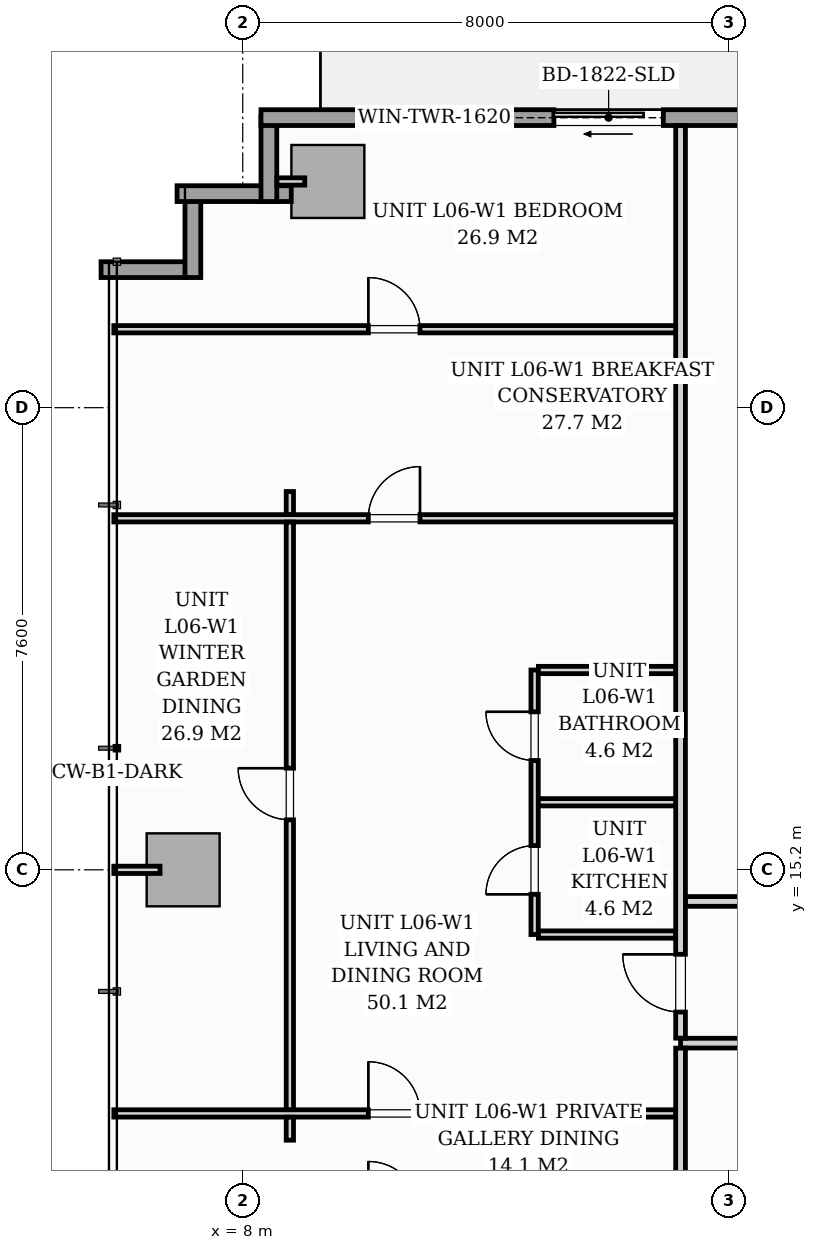
"""IFC4 building model, lengths in metres.
Left out: names, types, materials, properties, quantities, classifications, styles, units other than length and angle.
Written with IfcOpenShell. Run it as: python <this file> out.ifc"""

import sys

from ifc_helpers import new_model, si_unit, direction, frame, frame_2d, origin, origin_2d, place, context, subcontext, project, spatial, rectangle, extrude, source, transform, mapped, element, fill, save


model = new_model("IFC4")
c1 = context("Model", 3, precision=1e-05, world=origin(), true_north=direction((0.0, 1.0)))
c2 = subcontext(c1, "Body", "Model", "MODEL_VIEW")
j1 = project(units=[si_unit("LENGTHUNIT", "METRE"), si_unit("PLANEANGLEUNIT", "RADIAN")], contexts=[c1])
p1 = place(None, origin())
s1 = spatial("IfcSite", under=j1, at=p1, CompositionType="ELEMENT")
p2 = place(p1, origin())
s2 = spatial("IfcBuilding", under=s1, at=p2, CompositionType="ELEMENT")
p3 = place(p2, frame((0.0, 0.0, 26.2)))
s3 = spatial("IfcBuildingStorey", under=s2, at=p3, CompositionType="ELEMENT", Elevation=26.2)
m1 = source(origin(), c2, "Body", "SweptSolid", [
    extrude(rectangle(XDim=1.2, YDim=1.2, at=origin_2d()), origin(), (0.0, 0.0, 1.0), 3.196),
])
for number, where, z_axis, x_axis in (
    (1, (9.4, 26.52, 0.002), (0.0, 0.0, 1.0), (1.0, 0.0, 0.0)),
    (2, (7.02, 15.2, 0.002), (0.0, 0.0, 1.0), (1.0, 0.0, 0.0)),
):
    element("IfcColumn", number, at=place(p3, frame(where, z_axis=z_axis, x_axis=x_axis)), inside=s3, PredefinedType="COLUMN", context=c2, shape_type="MappedRepresentation", body=[
        mapped(m1, transform((0.0, 0.0, 0.0), scale=1.0)),
    ])
for number, where, z_axis, x_axis in (
    (3, (5.67, 25.07, 0.0), (0.0, 0.0, 1.0), (1.0, 0.0, 0.0)),
    (4, (7.18, 24.94, 0.0), (0.0, 0.0, 1.0), (0.0, 1.0, 0.0)),
):
    element("IfcWall", number, at=place(p3, frame(where, z_axis=z_axis, x_axis=x_axis)), inside=s3, PredefinedType="STANDARD", context=c2, shape_type="SweptSolid", body=[
        extrude(rectangle(XDim=1.395, YDim=0.26, at=frame_2d((0.698, 0.0))), origin(), (0.0, 0.0, 1.0), 2.94),
    ])
p4 = place(p3, frame((6.92, 26.32, 0.0), z_axis=(0.0, 0.0, 1.0), x_axis=(1.0, 0.0, 0.0)))
e5 = element("IfcWall", 5, at=p4, inside=s3, PredefinedType="STANDARD", context=c2, shape_type="SweptSolid", body=[
    extrude(rectangle(XDim=1.878, YDim=0.26, at=frame_2d((0.939, 0.0))), origin(), (0.0, 0.0, 1.0), 2.94),
])
p5 = place(p3, frame((8.43, 26.19, 0.0), z_axis=(0.0, 0.0, 1.0), x_axis=(0.0, 1.0, 0.0)))
e6 = element("IfcWall", 6, at=p5, inside=s3, PredefinedType="STANDARD", context=c2, shape_type="SweptSolid", body=[
    extrude(rectangle(XDim=1.395, YDim=0.26, at=frame_2d((0.698, 0.0))), origin(), (0.0, 0.0, 1.0), 2.94),
])
p6 = place(p3, frame((8.3, 27.57, 0.0), z_axis=(0.0, 0.0, 1.0), x_axis=(1.0, 0.0, 0.0)))
e7 = element("IfcWall", 7, at=p6, inside=s3, PredefinedType="STANDARD", context=c2, shape_type="SweptSolid", body=[
    extrude(rectangle(XDim=17.15, YDim=0.26, at=frame_2d((8.575, 0.0))), origin(), (0.0, 0.0, 1.0), 2.94),
])
p7 = place(p6, frame((4.817, 0.0, 0.0)))
e8 = element("IfcOpeningElement", 8, at=p7, cuts=e7, PredefinedType="OPENING", context=c2, shape_type="SweptSolid", body=[
    extrude(rectangle(XDim=1.8, YDim=2.06, at=frame_2d((0.9, 1.03))), frame((0.0, 0.14, 0.0), z_axis=(0.0, -1.0, 0.0), x_axis=(1.0, 0.0, 0.0)), (0.0, 0.0, 1.0), 0.28),
])
p8 = place(p6, frame((2.05, 0.0, 0.65)))
e9 = element("IfcOpeningElement", 9, at=p8, cuts=e7, PredefinedType="OPENING", context=c2, shape_type="SweptSolid", body=[
    extrude(rectangle(XDim=1.6, YDim=1.5, at=frame_2d((0.8, 0.75))), frame((0.0, 0.14, 0.0), z_axis=(0.0, -1.0, 0.0), x_axis=(1.0, 0.0, 0.0)), (0.0, 0.0, 1.0), 0.28),
])
p9 = place(p3, frame((15.2, 12.35, 0.0), z_axis=(0.0, 0.0, 1.0), x_axis=(1.0, 0.0, 0.0)))
e10 = element("IfcWall", 10, at=p9, inside=s3, PredefinedType="PARTITIONING", context=c2, shape_type="SweptSolid", body=[
    extrude(rectangle(XDim=37.1, YDim=0.16, at=frame_2d((18.55, 0.0))), origin(), (0.0, 0.0, 1.0), 2.94),
])
p10 = place(p9, frame((2.964, 0.0, 0.0)))
e11 = element("IfcOpeningElement", 11, at=p10, cuts=e10, PredefinedType="OPENING", context=c2, shape_type="SweptSolid", body=[
    extrude(rectangle(XDim=0.95, YDim=2.06, at=frame_2d((0.475, 1.03))), frame((0.0, 0.09, 0.0), z_axis=(0.0, -1.0, 0.0), x_axis=(1.0, 0.0, 0.0)), (0.0, 0.0, 1.0), 0.18),
])
p11 = place(p9, frame((28.202, 0.0, 0.0)))
e12 = element("IfcOpeningElement", 12, at=p11, cuts=e10, PredefinedType="OPENING", context=c2, shape_type="SweptSolid", body=[
    extrude(rectangle(XDim=0.95, YDim=2.06, at=frame_2d((0.475, 1.03))), frame((0.0, 0.09, 0.0), z_axis=(0.0, -1.0, 0.0), x_axis=(1.0, 0.0, 0.0)), (0.0, 0.0, 1.0), 0.18),
])
p12 = place(p3, frame((15.2, 2.962, 0.0), z_axis=(0.0, 0.0, 1.0), x_axis=(0.0, 1.0, 0.0)))
e13 = element("IfcWall", 13, at=p12, inside=s3, PredefinedType="PARTITIONING", context=c2, shape_type="SweptSolid", body=[
    extrude(rectangle(XDim=9.306, YDim=0.16, at=frame_2d((4.653, 0.0))), origin(), (0.0, 0.0, 1.0), 2.94),
])
p13 = place(p3, frame((15.2, 12.432, 0.0), z_axis=(0.0, 0.0, 1.0), x_axis=(0.0, 1.0, 0.0)))
e14 = element("IfcWall", 14, at=p13, inside=s3, PredefinedType="PARTITIONING", context=c2, shape_type="SweptSolid", body=[
    extrude(rectangle(XDim=15.006, YDim=0.16, at=frame_2d((7.503, 0.0))), origin(), (0.0, 0.0, 1.0), 2.94),
])
p14 = place(p13, frame((0.429, 0.0, 0.0)))
e15 = element("IfcOpeningElement", 15, at=p14, cuts=e14, PredefinedType="OPENING", context=c2, shape_type="SweptSolid", body=[
    extrude(rectangle(XDim=0.95, YDim=2.06, at=frame_2d((0.475, 1.03))), frame((0.0, 0.09, 0.0), z_axis=(0.0, -1.0, 0.0), x_axis=(1.0, 0.0, 0.0)), (0.0, 0.0, 1.0), 0.18),
])
p15 = place(p3, frame((12.8, 14.136, 0.0), z_axis=(0.0, 0.0, 1.0), x_axis=(0.0, 1.0, 0.0)))
e16 = element("IfcWall", 16, at=p15, inside=s3, PredefinedType="PARTITIONING", context=c2, shape_type="SweptSolid", body=[
    extrude(rectangle(XDim=4.35, YDim=0.12, at=frame_2d((2.175, 0.0))), origin(), (0.0, 0.0, 1.0), 2.94),
])
p16 = place(p15, frame((0.662, 0.0, 0.0)))
e17 = element("IfcOpeningElement", 17, at=p16, cuts=e16, PredefinedType="OPENING", context=c2, shape_type="SweptSolid", body=[
    extrude(rectangle(XDim=0.8, YDim=2.0, at=frame_2d((0.4, 1.0))), frame((0.0, 0.07, 0.0), z_axis=(0.0, -1.0, 0.0), x_axis=(1.0, 0.0, 0.0)), (0.0, 0.0, 1.0), 0.14),
])
p17 = place(p15, frame((2.862, 0.0, 0.0)))
e18 = element("IfcOpeningElement", 18, at=p17, cuts=e16, PredefinedType="OPENING", context=c2, shape_type="SweptSolid", body=[
    extrude(rectangle(XDim=0.8, YDim=2.02, at=frame_2d((0.4, 1.01))), frame((0.0, 0.07, 0.0), z_axis=(0.0, -1.0, 0.0), x_axis=(1.0, 0.0, 0.0)), (0.0, 0.0, 1.0), 0.14),
])
p18 = place(p3, frame((12.862, 16.311, 0.0), z_axis=(0.0, 0.0, 1.0), x_axis=(1.0, 0.0, 0.0)))
e19 = element("IfcWall", 19, at=p18, inside=s3, PredefinedType="PARTITIONING", context=c2, shape_type="SweptSolid", body=[
    extrude(rectangle(XDim=2.256, YDim=0.12, at=frame_2d((1.128, 0.0))), origin(), (0.0, 0.0, 1.0), 2.045),
])
for number, where, z_axis, x_axis in (
    (20, (12.862, 14.136, 0.0), (0.0, 0.0, 1.0), (1.0, 0.0, 0.0)),
    (21, (12.862, 18.486, 0.0), (0.0, 0.0, 1.0), (1.0, 0.0, 0.0)),
):
    element("IfcWall", number, at=place(p3, frame(where, z_axis=z_axis, x_axis=x_axis)), inside=s3, PredefinedType="PARTITIONING", context=c2, shape_type="SweptSolid", body=[
        extrude(rectangle(XDim=2.256, YDim=0.12, at=frame_2d((1.128, 0.0))), origin(), (0.0, 0.0, 1.0), 2.94),
    ])
p19 = place(p3, frame((5.88, 24.09, 0.0), z_axis=(0.0, 0.0, 1.0), x_axis=(1.0, 0.0, 0.0)))
e22 = element("IfcWall", 22, at=p19, inside=s3, PredefinedType="PARTITIONING", context=c2, shape_type="SweptSolid", body=[
    extrude(rectangle(XDim=9.238, YDim=0.12, at=frame_2d((4.619, 0.0))), origin(), (0.0, 0.0, 1.0), 2.94),
])
p20 = place(p19, frame((4.185, 0.0, 0.0)))
e23 = element("IfcOpeningElement", 23, at=p20, cuts=e22, PredefinedType="OPENING", context=c2, shape_type="SweptSolid", body=[
    extrude(rectangle(XDim=0.85, YDim=2.05, at=frame_2d((0.425, 1.025))), frame((0.0, 0.07, 0.0), z_axis=(0.0, -1.0, 0.0), x_axis=(1.0, 0.0, 0.0)), (0.0, 0.0, 1.0), 0.14),
])
p21 = place(p3, frame((5.88, 20.981, 0.0), z_axis=(0.0, 0.0, 1.0), x_axis=(1.0, 0.0, 0.0)))
e24 = element("IfcWall", 24, at=p21, inside=s3, PredefinedType="PARTITIONING", context=c2, shape_type="SweptSolid", body=[
    extrude(rectangle(XDim=9.238, YDim=0.12, at=frame_2d((4.619, 0.0))), origin(), (0.0, 0.0, 1.0), 2.94),
])
p22 = place(p21, frame((4.185, 0.0, 0.0)))
e25 = element("IfcOpeningElement", 25, at=p22, cuts=e24, PredefinedType="OPENING", context=c2, shape_type="SweptSolid", body=[
    extrude(rectangle(XDim=0.85, YDim=2.05, at=frame_2d((0.425, 1.025))), frame((0.0, 0.07, 0.0), z_axis=(0.0, -1.0, 0.0), x_axis=(1.0, 0.0, 0.0)), (0.0, 0.0, 1.0), 0.14),
])
p23 = place(p3, frame((5.88, 11.194, 0.0), z_axis=(0.0, 0.0, 1.0), x_axis=(1.0, 0.0, 0.0)))
e26 = element("IfcWall", 26, at=p23, inside=s3, PredefinedType="PARTITIONING", context=c2, shape_type="SweptSolid", body=[
    extrude(rectangle(XDim=9.238, YDim=0.12, at=frame_2d((4.619, 0.0))), origin(), (0.0, 0.0, 1.0), 2.94),
])
p24 = place(p23, frame((4.185, 0.0, 0.0)))
e27 = element("IfcOpeningElement", 27, at=p24, cuts=e26, PredefinedType="OPENING", context=c2, shape_type="SweptSolid", body=[
    extrude(rectangle(XDim=0.85, YDim=2.05, at=frame_2d((0.425, 1.025))), frame((0.0, 0.07, 0.0), z_axis=(0.0, -1.0, 0.0), x_axis=(1.0, 0.0, 0.0)), (0.0, 0.0, 1.0), 0.14),
])
p25 = place(p3, frame((8.775, 10.754, 0.0), z_axis=(0.0, 0.0, 1.0), x_axis=(0.0, 1.0, 0.0)))
e28 = element("IfcWall", 28, at=p25, inside=s3, PredefinedType="PARTITIONING", context=c2, shape_type="SweptSolid", body=[
    extrude(rectangle(XDim=0.378, YDim=0.12, at=frame_2d((0.189, 0.0))), origin(), (0.0, 0.0, 1.0), 2.94),
])
p26 = place(p3, frame((8.775, 11.256, 0.0), z_axis=(0.0, 0.0, 1.0), x_axis=(0.0, 1.0, 0.0)))
e29 = element("IfcWall", 29, at=p26, inside=s3, PredefinedType="PARTITIONING", context=c2, shape_type="SweptSolid", body=[
    extrude(rectangle(XDim=9.663, YDim=0.12, at=frame_2d((4.832, 0.0))), origin(), (0.0, 0.0, 1.0), 2.94),
])
p27 = place(p26, frame((4.766, 0.0, 0.0)))
e30 = element("IfcOpeningElement", 30, at=p27, cuts=e29, PredefinedType="OPENING", context=c2, shape_type="SweptSolid", body=[
    extrude(rectangle(XDim=0.85, YDim=2.05, at=frame_2d((0.425, 1.025))), frame((0.0, 0.07, 0.0), z_axis=(0.0, -1.0, 0.0), x_axis=(1.0, 0.0, 0.0)), (0.0, 0.0, 1.0), 0.14),
])
p28 = place(p3, frame((8.775, 21.043, 0.0), z_axis=(0.0, 0.0, 1.0), x_axis=(0.0, 1.0, 0.0)))
e31 = element("IfcWall", 31, at=p28, inside=s3, PredefinedType="PARTITIONING", context=c2, shape_type="SweptSolid", body=[
    extrude(rectangle(XDim=0.378, YDim=0.12, at=frame_2d((0.189, 0.0))), origin(), (0.0, 0.0, 1.0), 2.94),
])
p29 = place(p3, frame((15.282, 14.68, 0.0), z_axis=(0.0, 0.0, 1.0), x_axis=(1.0, 0.0, 0.0)))
e32 = element("IfcWall", 32, at=p29, inside=s3, PredefinedType="PARTITIONING", context=c2, shape_type="SweptSolid", body=[
    extrude(rectangle(XDim=10.878, YDim=0.16, at=frame_2d((5.439, 0.0))), origin(), (0.0, 0.0, 1.0), 2.94),
])
p30 = place(p29, frame((4.863, 0.0, 0.0)))
e33 = element("IfcOpeningElement", 33, at=p30, cuts=e32, PredefinedType="OPENING", context=c2, shape_type="SweptSolid", body=[
    extrude(rectangle(XDim=0.95, YDim=2.06, at=frame_2d((0.475, 1.03))), frame((0.0, 0.09, 0.0), z_axis=(0.0, -1.0, 0.0), x_axis=(1.0, 0.0, 0.0)), (0.0, 0.0, 1.0), 0.18),
])
p31 = place(p3, frame((9.02, 26.52, 0.0), z_axis=(0.0, 0.0, 1.0), x_axis=(-1.0, 0.0, 0.0)))
e34 = element("IfcWall", 34, at=p31, inside=s3, PredefinedType="PARTITIONING", context=c2, shape_type="SweptSolid", body=[
    extrude(rectangle(XDim=0.458, YDim=0.12, at=frame_2d((0.229, 0.0))), origin(), (0.0, 0.0, 1.0), 2.94),
])
p32 = place(p3, frame((6.64, 15.2, 0.0), z_axis=(0.0, 0.0, 1.0), x_axis=(-1.0, 0.0, 0.0)))
e35 = element("IfcWall", 35, at=p32, inside=s3, PredefinedType="PARTITIONING", context=c2, shape_type="SweptSolid", body=[
    extrude(rectangle(XDim=0.76, YDim=0.12, at=frame_2d((0.38, 0.0))), origin(), (0.0, 0.0, 1.0), 2.94),
])
m2 = source(origin(), c2, "Body", "SweptSolid", [
    extrude(rectangle(XDim=1.8, YDim=2.06, at=frame_2d((0.9, 1.03))), frame((0.0, 0.025, 0.0), z_axis=(0.0, -1.0, 0.0), x_axis=(1.0, 0.0, 0.0)), (0.0, 0.0, 1.0), 0.05),
])
p33 = place(p7, origin())
e36 = element("IfcDoor", 36, at=p33, inside=s3, OperationType="SLIDING_TO_LEFT", PredefinedType="DOOR", context=c2, shape_type="MappedRepresentation", body=[
    mapped(m2, transform((0.0, 0.0, 0.0), scale=1.0)),
])
fill(e8, e36)
m3 = source(origin(), c2, "Body", "SweptSolid", [
    extrude(rectangle(XDim=1.6, YDim=1.5, at=frame_2d((0.8, 0.75))), frame((0.0, 0.03, 0.0), z_axis=(0.0, -1.0, 0.0), x_axis=(1.0, 0.0, 0.0)), (0.0, 0.0, 1.0), 0.06),
])
p34 = place(p8, origin())
e37 = element("IfcWindow", 37, at=p34, inside=s3, PartitioningType="SINGLE_PANEL", PredefinedType="WINDOW", context=c2, shape_type="MappedRepresentation", body=[
    mapped(m3, transform((0.0, 0.0, 0.0), scale=1.0)),
])
fill(e9, e37)
m4 = source(origin(), c2, "Body", "SweptSolid", [
    extrude(rectangle(XDim=0.95, YDim=2.06, at=frame_2d((0.475, 1.03))), frame((0.0, 0.025, 0.0), z_axis=(0.0, -1.0, 0.0), x_axis=(1.0, 0.0, 0.0)), (0.0, 0.0, 1.0), 0.05),
])
p35 = place(p14, origin())
e38 = element("IfcDoor", 38, at=p35, inside=s3, OperationType="SINGLE_SWING_RIGHT", PredefinedType="DOOR", context=c2, shape_type="MappedRepresentation", body=[
    mapped(m4, transform((0.0, 0.0, 0.0), scale=1.0)),
])
fill(e15, e38)
m5 = source(origin(), c2, "Body", "SweptSolid", [
    extrude(rectangle(XDim=0.8, YDim=2.0, at=frame_2d((0.4, 1.0))), frame((0.0, 0.025, 0.0), z_axis=(0.0, -1.0, 0.0), x_axis=(1.0, 0.0, 0.0)), (0.0, 0.0, 1.0), 0.05),
])
p36 = place(p16, origin())
e39 = element("IfcDoor", 39, at=p36, inside=s3, OperationType="SINGLE_SWING_LEFT", PredefinedType="DOOR", context=c2, shape_type="MappedRepresentation", body=[
    mapped(m5, transform((0.0, 0.0, 0.0), scale=1.0)),
])
fill(e17, e39)
m6 = source(origin(), c2, "Body", "SweptSolid", [
    extrude(rectangle(XDim=0.8, YDim=2.02, at=frame_2d((0.4, 1.01))), frame((0.0, 0.025, 0.0), z_axis=(0.0, -1.0, 0.0), x_axis=(1.0, 0.0, 0.0)), (0.0, 0.0, 1.0), 0.05),
])
p37 = place(p17, origin())
e40 = element("IfcDoor", 40, at=p37, inside=s3, OperationType="SINGLE_SWING_RIGHT", PredefinedType="DOOR", context=c2, shape_type="MappedRepresentation", body=[
    mapped(m6, transform((0.0, 0.0, 0.0), scale=1.0)),
])
fill(e18, e40)
m7 = source(origin(), c2, "Body", "SweptSolid", [
    extrude(rectangle(XDim=0.85, YDim=2.05, at=frame_2d((0.425, 1.025))), frame((0.0, 0.025, 0.0), z_axis=(0.0, -1.0, 0.0), x_axis=(1.0, 0.0, 0.0)), (0.0, 0.0, 1.0), 0.05),
])
p38 = place(p20, origin())
e41 = element("IfcDoor", 41, at=p38, inside=s3, OperationType="SINGLE_SWING_LEFT", PredefinedType="DOOR", context=c2, shape_type="MappedRepresentation", body=[
    mapped(m7, transform((0.0, 0.0, 0.0), scale=1.0)),
])
fill(e23, e41)
p39 = place(p22, origin())
e42 = element("IfcDoor", 42, at=p39, inside=s3, OperationType="SINGLE_SWING_RIGHT", PredefinedType="DOOR", context=c2, shape_type="MappedRepresentation", body=[
    mapped(m7, transform((0.0, 0.0, 0.0), scale=1.0)),
])
fill(e25, e42)
p40 = place(p24, origin())
e43 = element("IfcDoor", 43, at=p40, inside=s3, OperationType="SINGLE_SWING_LEFT", PredefinedType="DOOR", context=c2, shape_type="MappedRepresentation", body=[
    mapped(m7, transform((0.0, 0.0, 0.0), scale=1.0)),
])
fill(e27, e43)
p41 = place(p27, origin())
e44 = element("IfcDoor", 44, at=p41, inside=s3, OperationType="SINGLE_SWING_RIGHT", PredefinedType="DOOR", context=c2, shape_type="MappedRepresentation", body=[
    mapped(m7, transform((0.0, 0.0, 0.0), scale=1.0)),
])
fill(e30, e44)
save(model, sys.argv[1])
